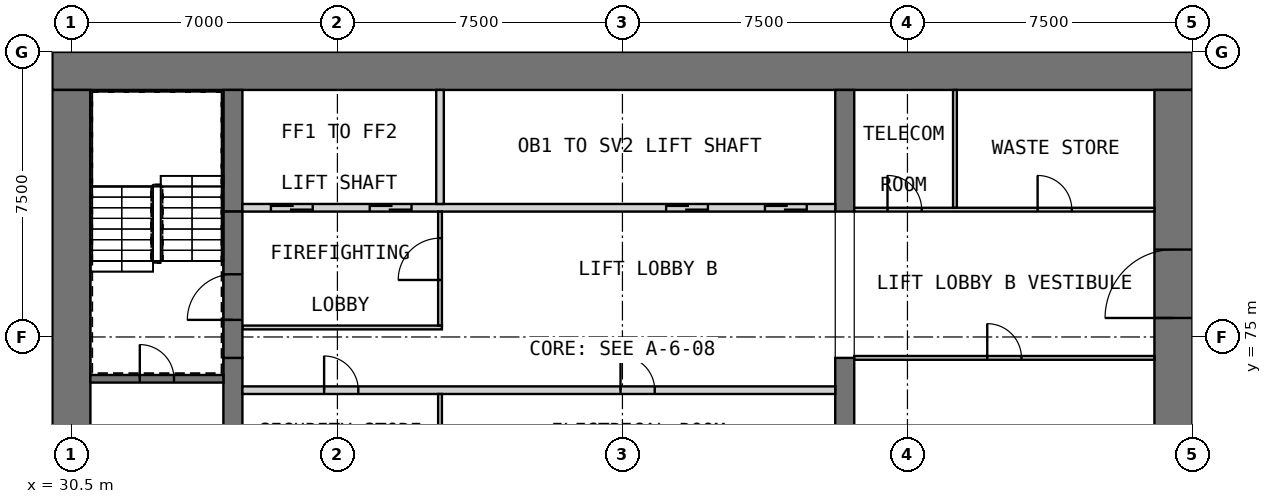
"""IFC4 building model, lengths in metres.
Left out: names, types, materials, properties, quantities, classifications, styles, units other than length and angle.
Written with IfcOpenShell. Run it as: python <this file> out.ifc"""

import sys

from ifc_helpers import new_model, si_unit, direction, frame, frame_2d, origin, place, context, subcontext, project, spatial, rectangle, extrude, element, fill, save


model = new_model("IFC4")
c1 = context("Model", 3, precision=1e-05, world=origin(), true_north=direction((0.0, 1.0)))
c2 = subcontext(c1, "Body", "Model", "MODEL_VIEW")
j1 = project(units=[si_unit("LENGTHUNIT", "METRE"), si_unit("PLANEANGLEUNIT", "RADIAN")], contexts=[c1])
p1 = place(None, origin())
s1 = spatial("IfcSite", under=j1, at=p1, CompositionType="ELEMENT")
p2 = place(p1, origin())
s2 = spatial("IfcBuilding", under=s1, at=p2, CompositionType="ELEMENT")
p3 = place(p2, frame((0.0, 0.0, 29.0)))
s3 = spatial("IfcBuildingStorey", under=s2, at=p3, CompositionType="ELEMENT", Elevation=29.0)
p4 = place(p3, frame((30.0, 82.0, 0.0), z_axis=(0.0, 0.0, 1.0), x_axis=(1.0, 0.0, 0.0)))
e1 = element("IfcWall", 1, at=p4, inside=s3, PredefinedType="SHEAR", context=c2, shape_type="SweptSolid", body=[
    extrude(rectangle(XDim=30.0, YDim=1.0, at=frame_2d((15.0, 0.0))), origin(), (0.0, 0.0, 1.0), 5.0),
])
p5 = place(p3, frame((30.5, 61.0, 0.0), z_axis=(0.0, 0.0, 1.0), x_axis=(0.0, 1.0, 0.0)))
e2 = element("IfcWall", 2, at=p5, inside=s3, PredefinedType="SHEAR", context=c2, shape_type="SweptSolid", body=[
    extrude(rectangle(XDim=20.5, YDim=1.0, at=frame_2d((10.25, 0.0))), origin(), (0.0, 0.0, 1.0), 5.0),
])
p6 = place(p3, frame((59.5, 61.0, 0.0), z_axis=(0.0, 0.0, 1.0), x_axis=(0.0, 1.0, 0.0)))
e3 = element("IfcWall", 3, at=p6, inside=s3, PredefinedType="SHEAR", context=c2, shape_type="SweptSolid", body=[
    extrude(rectangle(XDim=20.5, YDim=1.0, at=frame_2d((10.25, 0.0))), origin(), (0.0, 0.0, 1.0), 5.0),
])
p7 = place(p6, frame((14.5, 0.0, 0.0)))
e4 = element("IfcOpeningElement", 4, at=p7, cuts=e3, PredefinedType="OPENING", context=c2, shape_type="SweptSolid", body=[
    extrude(rectangle(XDim=1.8, YDim=2.1, at=frame_2d((0.9, 1.05))), frame((0.0, 0.51, 0.0), z_axis=(0.0, -1.0, 0.0), x_axis=(1.0, 0.0, 0.0)), (0.0, 0.0, 1.0), 1.02),
])
p8 = place(p3, frame((34.75, 68.05, 0.0), z_axis=(0.0, 0.0, 1.0), x_axis=(0.0, 1.0, 0.0)))
e5 = element("IfcWall", 5, at=p8, inside=s3, PredefinedType="SHEAR", context=c2, shape_type="SweptSolid", body=[
    extrude(rectangle(XDim=6.4, YDim=0.5, at=frame_2d((3.2, 0.0))), origin(), (0.0, 0.0, 1.0), 5.0),
])
p9 = place(p3, frame((34.75, 78.3, 0.0), z_axis=(0.0, 0.0, 1.0), x_axis=(0.0, 1.0, 0.0)))
e6 = element("IfcWall", 6, at=p9, inside=s3, PredefinedType="SHEAR", context=c2, shape_type="SweptSolid", body=[
    extrude(rectangle(XDim=3.2, YDim=0.5, at=frame_2d((1.6, 0.0))), origin(), (0.0, 0.0, 1.0), 5.0),
])
p10 = place(p3, frame((50.85, 68.05, 0.0), z_axis=(0.0, 0.0, 1.0), x_axis=(0.0, 1.0, 0.0)))
e7 = element("IfcWall", 7, at=p10, inside=s3, PredefinedType="SHEAR", context=c2, shape_type="SweptSolid", body=[
    extrude(rectangle(XDim=6.4, YDim=0.5, at=frame_2d((3.2, 0.0))), origin(), (0.0, 0.0, 1.0), 5.0),
])
p11 = place(p3, frame((50.85, 78.3, 0.0), z_axis=(0.0, 0.0, 1.0), x_axis=(0.0, 1.0, 0.0)))
e8 = element("IfcWall", 8, at=p11, inside=s3, PredefinedType="SHEAR", context=c2, shape_type="SweptSolid", body=[
    extrude(rectangle(XDim=3.2, YDim=0.5, at=frame_2d((1.6, 0.0))), origin(), (0.0, 0.0, 1.0), 5.0),
])
p12 = place(p3, frame((35.0, 73.6, 0.0), z_axis=(0.0, 0.0, 1.0), x_axis=(1.0, 0.0, 0.0)))
e9 = element("IfcWall", 9, at=p12, inside=s3, PredefinedType="PARTITIONING", context=c2, shape_type="SweptSolid", body=[
    extrude(rectangle(XDim=15.6, YDim=0.2, at=frame_2d((7.8, 0.0))), origin(), (0.0, 0.0, 1.0), 4.75),
])
p13 = place(p12, frame((2.15, 0.0, 0.0)))
e10 = element("IfcOpeningElement", 10, at=p13, cuts=e9, PredefinedType="OPENING", context=c2, shape_type="SweptSolid", body=[
    extrude(rectangle(XDim=0.9, YDim=2.1, at=frame_2d((0.45, 1.05))), frame((0.0, 0.11, 0.0), z_axis=(0.0, -1.0, 0.0), x_axis=(1.0, 0.0, 0.0)), (0.0, 0.0, 1.0), 0.22),
])
p14 = place(p12, frame((9.95, 0.0, 0.0)))
e11 = element("IfcOpeningElement", 11, at=p14, cuts=e9, PredefinedType="OPENING", context=c2, shape_type="SweptSolid", body=[
    extrude(rectangle(XDim=0.9, YDim=2.1, at=frame_2d((0.45, 1.05))), frame((0.0, 0.11, 0.0), z_axis=(0.0, -1.0, 0.0), x_axis=(1.0, 0.0, 0.0)), (0.0, 0.0, 1.0), 0.22),
])
p15 = place(p3, frame((40.2, 71.5, 0.0), z_axis=(0.0, 0.0, 1.0), x_axis=(0.0, 1.0, 0.0)))
e12 = element("IfcWall", 12, at=p15, inside=s3, PredefinedType="PARTITIONING", context=c2, shape_type="SweptSolid", body=[
    extrude(rectangle(XDim=2.0, YDim=0.1, at=frame_2d((1.0, 0.0))), origin(), (0.0, 0.0, 1.0), 4.75),
])
p16 = place(p3, frame((35.0, 78.4, 0.0), z_axis=(0.0, 0.0, 1.0), x_axis=(1.0, 0.0, 0.0)))
e13 = element("IfcWall", 13, at=p16, inside=s3, PredefinedType="SOLIDWALL", context=c2, shape_type="SweptSolid", body=[
    extrude(rectangle(XDim=15.6, YDim=0.2, at=frame_2d((7.8, 0.0))), origin(), (0.0, 0.0, 1.0), 5.0),
])
p17 = place(p16, frame((0.75, 0.0, 0.0)))
e14 = element("IfcOpeningElement", 14, at=p17, cuts=e13, PredefinedType="OPENING", context=c2, shape_type="SweptSolid", body=[
    extrude(rectangle(XDim=1.1, YDim=2.1, at=frame_2d((0.55, 1.05))), frame((0.0, 0.11, 0.0), z_axis=(0.0, -1.0, 0.0), x_axis=(1.0, 0.0, 0.0)), (0.0, 0.0, 1.0), 0.22),
])
p18 = place(p16, frame((3.35, 0.0, 0.0)))
e15 = element("IfcOpeningElement", 15, at=p18, cuts=e13, PredefinedType="OPENING", context=c2, shape_type="SweptSolid", body=[
    extrude(rectangle(XDim=1.1, YDim=2.1, at=frame_2d((0.55, 1.05))), frame((0.0, 0.11, 0.0), z_axis=(0.0, -1.0, 0.0), x_axis=(1.0, 0.0, 0.0)), (0.0, 0.0, 1.0), 0.22),
])
p19 = place(p16, frame((11.15, 0.0, 0.0)))
e16 = element("IfcOpeningElement", 16, at=p19, cuts=e13, PredefinedType="OPENING", context=c2, shape_type="SweptSolid", body=[
    extrude(rectangle(XDim=1.1, YDim=2.1, at=frame_2d((0.55, 1.05))), frame((0.0, 0.11, 0.0), z_axis=(0.0, -1.0, 0.0), x_axis=(1.0, 0.0, 0.0)), (0.0, 0.0, 1.0), 0.22),
])
p20 = place(p16, frame((13.75, 0.0, 0.0)))
e17 = element("IfcOpeningElement", 17, at=p20, cuts=e13, PredefinedType="OPENING", context=c2, shape_type="SweptSolid", body=[
    extrude(rectangle(XDim=1.1, YDim=2.1, at=frame_2d((0.55, 1.05))), frame((0.0, 0.11, 0.0), z_axis=(0.0, -1.0, 0.0), x_axis=(1.0, 0.0, 0.0)), (0.0, 0.0, 1.0), 0.22),
])
p21 = place(p3, frame((40.2, 78.5, 0.0), z_axis=(0.0, 0.0, 1.0), x_axis=(0.0, 1.0, 0.0)))
e18 = element("IfcWall", 18, at=p21, inside=s3, PredefinedType="SOLIDWALL", context=c2, shape_type="SweptSolid", body=[
    extrude(rectangle(XDim=3.0, YDim=0.2, at=frame_2d((1.5, 0.0))), origin(), (0.0, 0.0, 1.0), 5.0),
])
p22 = place(p3, frame((35.0, 75.25, 0.0), z_axis=(0.0, 0.0, 1.0), x_axis=(1.0, 0.0, 0.0)))
e19 = element("IfcWall", 19, at=p22, inside=s3, PredefinedType="PARTITIONING", context=c2, shape_type="SweptSolid", body=[
    extrude(rectangle(XDim=5.25, YDim=0.1, at=frame_2d((2.625, 0.0))), origin(), (0.0, 0.0, 1.0), 4.75),
])
p23 = place(p3, frame((40.2, 75.3, 0.0), z_axis=(0.0, 0.0, 1.0), x_axis=(0.0, 1.0, 0.0)))
e20 = element("IfcWall", 20, at=p23, inside=s3, PredefinedType="PARTITIONING", context=c2, shape_type="SweptSolid", body=[
    extrude(rectangle(XDim=3.0, YDim=0.1, at=frame_2d((1.5, 0.0))), origin(), (0.0, 0.0, 1.0), 4.75),
])
p24 = place(p23, frame((1.2, 0.0, 0.0)))
e21 = element("IfcOpeningElement", 21, at=p24, cuts=e20, PredefinedType="OPENING", context=c2, shape_type="SweptSolid", body=[
    extrude(rectangle(XDim=1.1, YDim=2.1, at=frame_2d((0.55, 1.05))), frame((0.0, 0.06, 0.0), z_axis=(0.0, -1.0, 0.0), x_axis=(1.0, 0.0, 0.0)), (0.0, 0.0, 1.0), 0.12),
])
p25 = place(p3, frame((34.75, 74.45, 0.0), z_axis=(0.0, 0.0, 1.0), x_axis=(0.0, 1.0, 0.0)))
e22 = element("IfcWall", 22, at=p25, inside=s3, PredefinedType="SOLIDWALL", context=c2, shape_type="SweptSolid", body=[
    extrude(rectangle(XDim=3.85, YDim=0.5, at=frame_2d((1.925, 0.0))), origin(), (0.0, 0.0, 1.0), 3.8),
])
p26 = place(p25, frame((1.0, 0.0, 0.0)))
e23 = element("IfcOpeningElement", 23, at=p26, cuts=e22, PredefinedType="OPENING", context=c2, shape_type="SweptSolid", body=[
    extrude(rectangle(XDim=1.2, YDim=2.1, at=frame_2d((0.6, 1.05))), frame((0.0, 0.26, 0.0), z_axis=(0.0, -1.0, 0.0), x_axis=(1.0, 0.0, 0.0)), (0.0, 0.0, 1.0), 0.52),
])
p27 = place(p3, frame((31.0, 73.9, 0.0), z_axis=(0.0, 0.0, 1.0), x_axis=(1.0, 0.0, 0.0)))
e24 = element("IfcWall", 24, at=p27, inside=s3, PredefinedType="SOLIDWALL", context=c2, shape_type="SweptSolid", body=[
    extrude(rectangle(XDim=3.5, YDim=0.2, at=frame_2d((1.75, 0.0))), origin(), (0.0, 0.0, 1.0), 4.75),
])
p28 = place(p27, frame((1.3, 0.0, 0.0)))
e25 = element("IfcOpeningElement", 25, at=p28, cuts=e24, PredefinedType="OPENING", context=c2, shape_type="SweptSolid", body=[
    extrude(rectangle(XDim=0.9, YDim=2.1, at=frame_2d((0.45, 1.05))), frame((0.0, 0.11, 0.0), z_axis=(0.0, -1.0, 0.0), x_axis=(1.0, 0.0, 0.0)), (0.0, 0.0, 1.0), 0.22),
])
p29 = place(p3, frame((51.1, 74.45, 0.0), z_axis=(0.0, 0.0, 1.0), x_axis=(1.0, 0.0, 0.0)))
e26 = element("IfcWall", 26, at=p29, inside=s3, PredefinedType="PARTITIONING", context=c2, shape_type="SweptSolid", body=[
    extrude(rectangle(XDim=7.9, YDim=0.1, at=frame_2d((3.95, 0.0))), origin(), (0.0, 0.0, 1.0), 4.75),
])
p30 = place(p29, frame((3.5, 0.0, 0.0)))
e27 = element("IfcOpeningElement", 27, at=p30, cuts=e26, PredefinedType="OPENING", context=c2, shape_type="SweptSolid", body=[
    extrude(rectangle(XDim=0.9, YDim=2.1, at=frame_2d((0.45, 1.05))), frame((0.0, 0.06, 0.0), z_axis=(0.0, -1.0, 0.0), x_axis=(1.0, 0.0, 0.0)), (0.0, 0.0, 1.0), 0.12),
])
p31 = place(p3, frame((51.1, 78.35, 0.0), z_axis=(0.0, 0.0, 1.0), x_axis=(1.0, 0.0, 0.0)))
e28 = element("IfcWall", 28, at=p31, inside=s3, PredefinedType="PARTITIONING", context=c2, shape_type="SweptSolid", body=[
    extrude(rectangle(XDim=7.9, YDim=0.1, at=frame_2d((3.95, 0.0))), origin(), (0.0, 0.0, 1.0), 4.75),
])
p32 = place(p31, frame((0.875, 0.0, 0.0)))
e29 = element("IfcOpeningElement", 29, at=p32, cuts=e28, PredefinedType="OPENING", context=c2, shape_type="SweptSolid", body=[
    extrude(rectangle(XDim=0.9, YDim=2.1, at=frame_2d((0.45, 1.05))), frame((0.0, 0.06, 0.0), z_axis=(0.0, -1.0, 0.0), x_axis=(1.0, 0.0, 0.0)), (0.0, 0.0, 1.0), 0.12),
])
p33 = place(p31, frame((4.825, 0.0, 0.0)))
e30 = element("IfcOpeningElement", 30, at=p33, cuts=e28, PredefinedType="OPENING", context=c2, shape_type="SweptSolid", body=[
    extrude(rectangle(XDim=0.9, YDim=2.1, at=frame_2d((0.45, 1.05))), frame((0.0, 0.06, 0.0), z_axis=(0.0, -1.0, 0.0), x_axis=(1.0, 0.0, 0.0)), (0.0, 0.0, 1.0), 0.12),
])
p34 = place(p3, frame((53.75, 78.4, 0.0), z_axis=(0.0, 0.0, 1.0), x_axis=(0.0, 1.0, 0.0)))
e31 = element("IfcWall", 31, at=p34, inside=s3, PredefinedType="PARTITIONING", context=c2, shape_type="SweptSolid", body=[
    extrude(rectangle(XDim=3.1, YDim=0.1, at=frame_2d((1.55, 0.0))), origin(), (0.0, 0.0, 1.0), 4.75),
])
p35 = place(p13, origin())
e32 = element("IfcDoor", 32, at=p35, inside=s3, OperationType="SINGLE_SWING_LEFT", PredefinedType="DOOR", context=c2, shape_type="SweptSolid", body=[
    extrude(rectangle(XDim=0.9, YDim=2.1, at=frame_2d((0.45, 1.05))), frame((0.0, 0.025, 0.0), z_axis=(0.0, -1.0, 0.0), x_axis=(1.0, 0.0, 0.0)), (0.0, 0.0, 1.0), 0.05),
])
fill(e10, e32)
p36 = place(p14, origin())
e33 = element("IfcDoor", 33, at=p36, inside=s3, OperationType="SINGLE_SWING_RIGHT", PredefinedType="DOOR", context=c2, shape_type="SweptSolid", body=[
    extrude(rectangle(XDim=0.9, YDim=2.1, at=frame_2d((0.45, 1.05))), frame((0.0, 0.025, 0.0), z_axis=(0.0, -1.0, 0.0), x_axis=(1.0, 0.0, 0.0)), (0.0, 0.0, 1.0), 0.05),
])
fill(e11, e33)
p37 = place(p17, origin())
e34 = element("IfcDoor", 34, at=p37, inside=s3, OperationType="DOUBLE_DOOR_SLIDING", PredefinedType="DOOR", context=c2, shape_type="SweptSolid", body=[
    extrude(rectangle(XDim=1.1, YDim=2.1, at=frame_2d((0.55, 1.05))), frame((0.0, 0.025, 0.0), z_axis=(0.0, -1.0, 0.0), x_axis=(1.0, 0.0, 0.0)), (0.0, 0.0, 1.0), 0.05),
])
fill(e14, e34)
p38 = place(p18, origin())
e35 = element("IfcDoor", 35, at=p38, inside=s3, OperationType="DOUBLE_DOOR_SLIDING", PredefinedType="DOOR", context=c2, shape_type="SweptSolid", body=[
    extrude(rectangle(XDim=1.1, YDim=2.1, at=frame_2d((0.55, 1.05))), frame((0.0, 0.025, 0.0), z_axis=(0.0, -1.0, 0.0), x_axis=(1.0, 0.0, 0.0)), (0.0, 0.0, 1.0), 0.05),
])
fill(e15, e35)
p39 = place(p19, origin())
e36 = element("IfcDoor", 36, at=p39, inside=s3, OperationType="DOUBLE_DOOR_SLIDING", PredefinedType="DOOR", context=c2, shape_type="SweptSolid", body=[
    extrude(rectangle(XDim=1.1, YDim=2.1, at=frame_2d((0.55, 1.05))), frame((0.0, 0.025, 0.0), z_axis=(0.0, -1.0, 0.0), x_axis=(1.0, 0.0, 0.0)), (0.0, 0.0, 1.0), 0.05),
])
fill(e16, e36)
p40 = place(p20, origin())
e37 = element("IfcDoor", 37, at=p40, inside=s3, OperationType="DOUBLE_DOOR_SLIDING", PredefinedType="DOOR", context=c2, shape_type="SweptSolid", body=[
    extrude(rectangle(XDim=1.1, YDim=2.1, at=frame_2d((0.55, 1.05))), frame((0.0, 0.025, 0.0), z_axis=(0.0, -1.0, 0.0), x_axis=(1.0, 0.0, 0.0)), (0.0, 0.0, 1.0), 0.05),
])
fill(e17, e37)
p41 = place(p7, origin())
e38 = element("IfcDoor", 38, at=p41, inside=s3, OperationType="DOUBLE_DOOR_SINGLE_SWING", PredefinedType="DOOR", context=c2, shape_type="SweptSolid", body=[
    extrude(rectangle(XDim=1.8, YDim=2.1, at=frame_2d((0.9, 1.05))), frame((0.0, 0.025, 0.0), z_axis=(0.0, -1.0, 0.0), x_axis=(1.0, 0.0, 0.0)), (0.0, 0.0, 1.0), 0.05),
])
fill(e4, e38)
p42 = place(p24, origin())
e39 = element("IfcDoor", 39, at=p42, inside=s3, OperationType="SINGLE_SWING_LEFT", PredefinedType="DOOR", context=c2, shape_type="SweptSolid", body=[
    extrude(rectangle(XDim=1.1, YDim=2.1, at=frame_2d((0.55, 1.05))), frame((0.0, 0.025, 0.0), z_axis=(0.0, -1.0, 0.0), x_axis=(1.0, 0.0, 0.0)), (0.0, 0.0, 1.0), 0.05),
])
fill(e21, e39)
p43 = place(p26, origin())
e40 = element("IfcDoor", 40, at=p43, inside=s3, OperationType="SINGLE_SWING_RIGHT", PredefinedType="DOOR", context=c2, shape_type="SweptSolid", body=[
    extrude(rectangle(XDim=1.2, YDim=2.1, at=frame_2d((0.6, 1.05))), frame((0.0, 0.025, 0.0), z_axis=(0.0, -1.0, 0.0), x_axis=(1.0, 0.0, 0.0)), (0.0, 0.0, 1.0), 0.05),
])
fill(e23, e40)
p44 = place(p28, origin())
e41 = element("IfcDoor", 41, at=p44, inside=s3, OperationType="SINGLE_SWING_RIGHT", PredefinedType="DOOR", context=c2, shape_type="SweptSolid", body=[
    extrude(rectangle(XDim=0.9, YDim=2.1, at=frame_2d((0.45, 1.05))), frame((0.0, 0.025, 0.0), z_axis=(0.0, -1.0, 0.0), x_axis=(1.0, 0.0, 0.0)), (0.0, 0.0, 1.0), 0.05),
])
fill(e25, e41)
p45 = place(p30, origin())
e42 = element("IfcDoor", 42, at=p45, inside=s3, OperationType="SINGLE_SWING_LEFT", PredefinedType="DOOR", context=c2, shape_type="SweptSolid", body=[
    extrude(rectangle(XDim=0.9, YDim=2.1, at=frame_2d((0.45, 1.05))), frame((0.0, 0.025, 0.0), z_axis=(0.0, -1.0, 0.0), x_axis=(1.0, 0.0, 0.0)), (0.0, 0.0, 1.0), 0.05),
])
fill(e27, e42)
p46 = place(p32, origin())
e43 = element("IfcDoor", 43, at=p46, inside=s3, OperationType="SINGLE_SWING_LEFT", PredefinedType="DOOR", context=c2, shape_type="SweptSolid", body=[
    extrude(rectangle(XDim=0.9, YDim=2.1, at=frame_2d((0.45, 1.05))), frame((0.0, 0.025, 0.0), z_axis=(0.0, -1.0, 0.0), x_axis=(1.0, 0.0, 0.0)), (0.0, 0.0, 1.0), 0.05),
])
fill(e29, e43)
p47 = place(p33, origin())
e44 = element("IfcDoor", 44, at=p47, inside=s3, OperationType="SINGLE_SWING_RIGHT", PredefinedType="DOOR", context=c2, shape_type="SweptSolid", body=[
    extrude(rectangle(XDim=0.9, YDim=2.1, at=frame_2d((0.45, 1.05))), frame((0.0, 0.025, 0.0), z_axis=(0.0, -1.0, 0.0), x_axis=(1.0, 0.0, 0.0)), (0.0, 0.0, 1.0), 0.05),
])
fill(e30, e44)
save(model, sys.argv[1])
